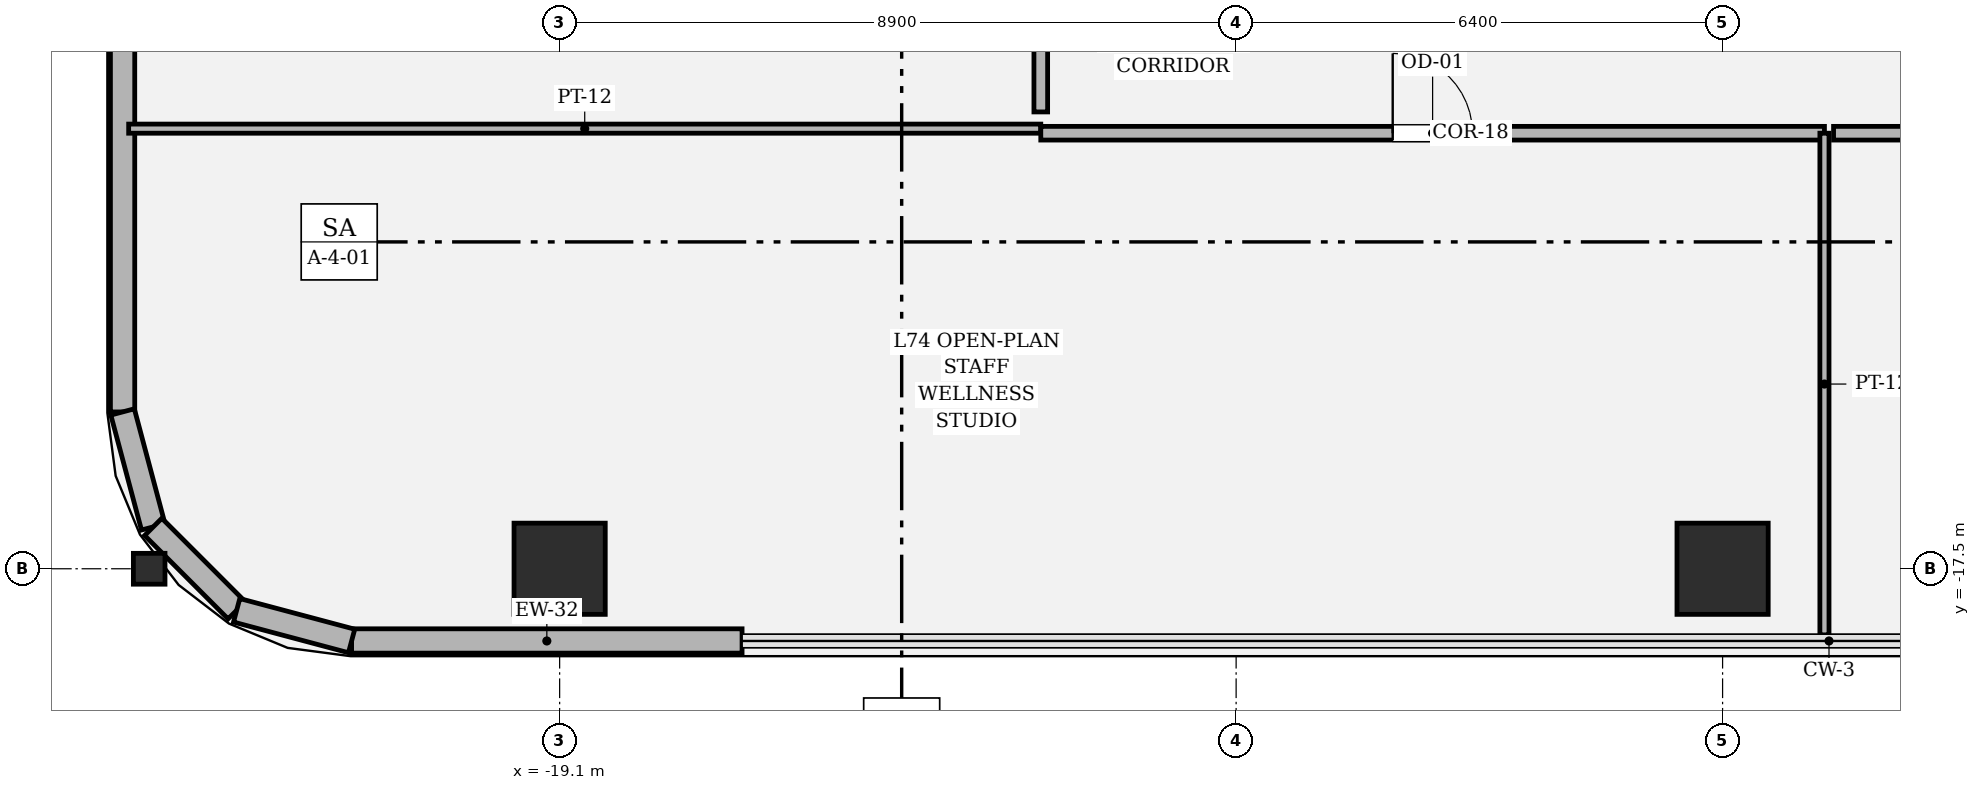
"""IFC4 building model, lengths in metres.
Left out: names, types, materials, properties, quantities, classifications, styles, units other than length and angle.
Written with IfcOpenShell. Run it as: python <this file> out.ifc"""

import sys

from ifc_helpers import new_model, si_unit, direction, frame, frame_2d, origin, origin_2d, place, context, subcontext, project, spatial, rectangle, hollow_rectangle, i_section, extrude, element, fill, save


model = new_model("IFC4")
c1 = context("Model", 3, precision=1e-05, world=origin(), true_north=direction((0.0, 1.0)))
c2 = subcontext(c1, "Body", "Model", "MODEL_VIEW")
j1 = project(units=[si_unit("LENGTHUNIT", "METRE"), si_unit("PLANEANGLEUNIT", "RADIAN")], contexts=[c1])
p1 = place(None, origin())
s1 = spatial("IfcSite", under=j1, at=p1, CompositionType="ELEMENT")
p2 = place(p1, origin())
s2 = spatial("IfcBuilding", under=s1, at=p2, CompositionType="ELEMENT")
p3 = place(p2, frame((0.0, 0.0, 313.2)))
s3 = spatial("IfcBuildingStorey", under=s2, at=p3, CompositionType="ELEMENT", Elevation=313.2)
for number, where, z_axis, x_axis in (
    (1, (-19.1, -17.5, 0.0), (0.0, 0.0, 1.0), (1.0, 0.0, 0.0)),
    (2, (-3.8, -17.5, 0.0), (0.0, 0.0, 1.0), (1.0, 0.0, 0.0)),
):
    element("IfcColumn", number, at=place(p3, frame(where, z_axis=z_axis, x_axis=x_axis)), inside=s3, PredefinedType="COLUMN", context=c2, shape_type="SweptSolid", body=[
        extrude(hollow_rectangle(XDim=1.2, YDim=1.2, WallThickness=0.035, at=origin_2d()), origin(), (0.0, 0.0, 1.0), 4.2),
    ])
p4 = place(p3, frame((-24.5, -17.5, 0.0), z_axis=(0.0, 0.0, 1.0), x_axis=(0.0, 1.0, 0.0)))
e3 = element("IfcColumn", 3, at=p4, inside=s3, PredefinedType="COLUMN", context=c2, shape_type="SweptSolid", body=[
    extrude(i_section(OverallWidth=0.406, OverallDepth=0.416, WebThickness=0.029, FlangeThickness=0.048, FilletRadius=0.018, at=origin_2d()), origin(), (0.0, 0.0, 1.0), 4.198),
])
for number, where, z_axis, x_axis in (
    (4, (-21.837, -18.45, 0.0), (0.0, 0.0, 1.0), (1.0, 0.0, 0.0)),
    (5, (-24.85, -10.3, 0.0), (0.0, 0.0, 1.0), (0.0, -1.0, 0.0)),
):
    element("IfcWall", number, at=place(p3, frame(where, z_axis=z_axis, x_axis=x_axis)), inside=s3, PredefinedType="SOLIDWALL", context=c2, shape_type="SweptSolid", body=[
        extrude(rectangle(XDim=5.137, YDim=0.32, at=frame_2d((2.568, 0.0))), origin(), (0.0, 0.0, 1.0), 2.594),
    ])
p5 = place(p3, frame((-24.85, -15.437, 0.0), z_axis=(0.0, 0.0, 1.0), x_axis=(0.257847112249, -0.966185730957, 0.0)))
e6 = element("IfcWall", 6, at=p5, inside=s3, PredefinedType="SOLIDWALL", context=c2, shape_type="SweptSolid", body=[
    extrude(rectangle(XDim=1.565, YDim=0.32, at=frame_2d((0.783, 0.0))), origin(), (0.0, 0.0, 1.0), 2.594),
])
p6 = place(p3, frame((-24.447, -16.949, 0.0), z_axis=(0.0, 0.0, 1.0), x_axis=(0.707106781187, -0.707106781187, 0.0)))
e7 = element("IfcWall", 7, at=p6, inside=s3, PredefinedType="SOLIDWALL", context=c2, shape_type="SweptSolid", body=[
    extrude(rectangle(XDim=1.552, YDim=0.32, at=frame_2d((0.776, 0.0))), origin(), (0.0, 0.0, 1.0), 2.594),
])
p7 = place(p3, frame((-23.349, -18.047, 0.0), z_axis=(0.0, 0.0, 1.0), x_axis=(0.966224582397, -0.257701486942, 0.0)))
e8 = element("IfcWall", 8, at=p7, inside=s3, PredefinedType="SOLIDWALL", context=c2, shape_type="SweptSolid", body=[
    extrude(rectangle(XDim=1.565, YDim=0.32, at=frame_2d((0.783, 0.0))), origin(), (0.0, 0.0, 1.0), 3.92),
])
p8 = place(p3, frame((-24.77, -11.71, 0.0), z_axis=(0.0, 0.0, 1.0), x_axis=(1.0, 0.0, 0.0)))
e9 = element("IfcWall", 9, at=p8, inside=s3, PredefinedType="PARTITIONING", context=c2, shape_type="SweptSolid", body=[
    extrude(rectangle(XDim=12.0, YDim=0.12, at=frame_2d((6.0, 0.0))), origin(), (0.0, 0.0, 1.0), 2.594),
])
p9 = place(p3, frame((-12.77, -11.77, 0.0), z_axis=(0.0, 0.0, 1.0), x_axis=(1.0, 0.0, 0.0)))
e10 = element("IfcWall", 10, at=p9, inside=s3, PredefinedType="PARTITIONING", context=c2, shape_type="SweptSolid", body=[
    extrude(rectangle(XDim=10.31, YDim=0.18, at=frame_2d((5.155, 0.0))), origin(), (0.0, 0.0, 1.0), 2.594),
])
p10 = place(p9, frame((4.63, 0.0, 0.0)))
e11 = element("IfcOpeningElement", 11, at=p10, cuts=e10, PredefinedType="OPENING", context=c2, shape_type="SweptSolid", body=[
    extrude(rectangle(XDim=1.05, YDim=2.2, at=frame_2d((0.525, 1.1))), frame((0.0, 0.1, 0.0), z_axis=(0.0, -1.0, 0.0), x_axis=(1.0, 0.0, 0.0)), (0.0, 0.0, 1.0), 0.2),
])
p11 = place(p3, frame((-2.46, -11.77, 0.0), z_axis=(0.0, 0.0, 1.0), x_axis=(0.0, -1.0, 0.0)))
e12 = element("IfcWall", 12, at=p11, inside=s3, PredefinedType="PARTITIONING", context=c2, shape_type="SweptSolid", body=[
    extrude(rectangle(XDim=6.6, YDim=0.12, at=frame_2d((3.3, 0.0))), origin(), (0.0, 0.0, 1.0), 2.594),
])
p12 = place(p3, frame((-2.34, -11.77, 0.0), z_axis=(0.0, 0.0, 1.0), x_axis=(1.0, 0.0, 0.0)))
e13 = element("IfcWall", 13, at=p12, inside=s3, PredefinedType="PARTITIONING", context=c2, shape_type="SweptSolid", body=[
    extrude(rectangle(XDim=15.11, YDim=0.18, at=frame_2d((7.555, 0.0))), origin(), (0.0, 0.0, 1.0), 2.594),
])
p13 = place(p12, frame((7.03, 0.0, 0.0)))
e14 = element("IfcOpeningElement", 14, at=p13, cuts=e13, PredefinedType="OPENING", context=c2, shape_type="SweptSolid", body=[
    extrude(rectangle(XDim=1.05, YDim=2.2, at=frame_2d((0.525, 1.1))), frame((0.0, 0.1, 0.0), z_axis=(0.0, -1.0, 0.0), x_axis=(1.0, 0.0, 0.0)), (0.0, 0.0, 1.0), 0.2),
])
p14 = place(p3, frame((-12.77, -1.2, 0.0), z_axis=(0.0, 0.0, 1.0), x_axis=(0.0, -1.0, 0.0)))
e15 = element("IfcWall", 15, at=p14, inside=s3, PredefinedType="PARTITIONING", context=c2, shape_type="SweptSolid", body=[
    extrude(rectangle(XDim=10.29, YDim=0.18, at=frame_2d((5.145, 0.0))), origin(), (0.0, 0.0, 1.0), 2.594),
])
p15 = place(p10, origin())
e16 = element("IfcDoor", 16, at=p15, inside=s3, OperationType="SINGLE_SWING_LEFT", PredefinedType="DOOR", context=c2, shape_type="SweptSolid", body=[
    extrude(rectangle(XDim=1.05, YDim=2.2, at=frame_2d((0.525, 1.1))), frame((0.0, 0.025, 0.0), z_axis=(0.0, -1.0, 0.0), x_axis=(1.0, 0.0, 0.0)), (0.0, 0.0, 1.0), 0.05),
])
fill(e11, e16)
save(model, sys.argv[1])
